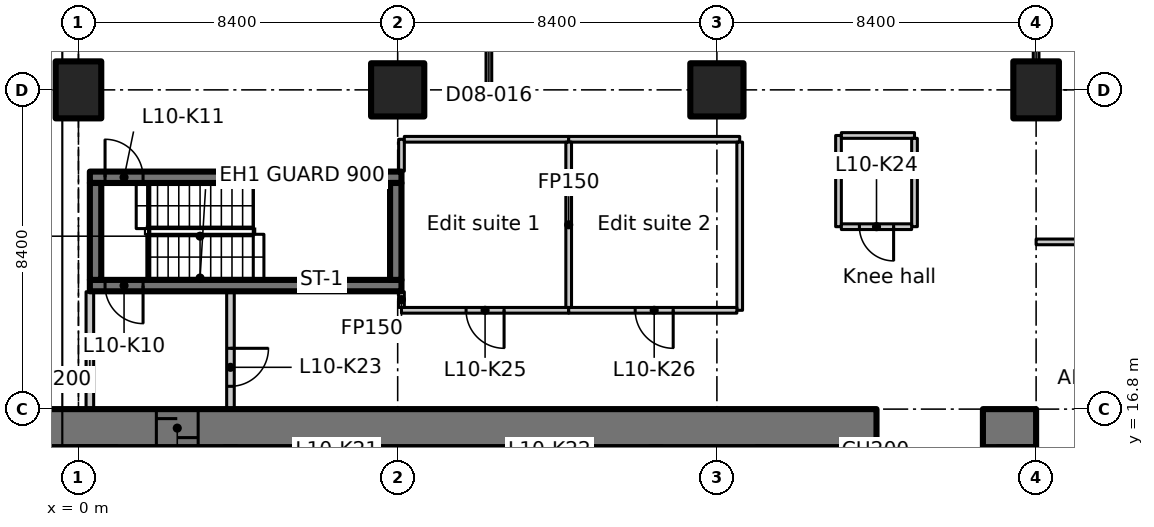
"""IFC4 building model, lengths in metres.
Left out: names, types, materials, properties, quantities, classifications, styles, units other than length and angle.
Written with IfcOpenShell. Run it as: python <this file> out.ifc"""

import sys

from ifc_helpers import new_model, si_unit, direction, frame, frame_2d, origin, origin_2d, place, context, subcontext, project, spatial, polyline, rectangle, outline, extrude, element, fill, save


model = new_model("IFC4")
c1 = context("Model", 3, precision=1e-05, world=origin(), true_north=direction((0.0, 1.0)))
c2 = subcontext(c1, "Body", "Model", "MODEL_VIEW")
j1 = project(units=[si_unit("LENGTHUNIT", "METRE"), si_unit("PLANEANGLEUNIT", "RADIAN")], contexts=[c1])
p1 = place(None, origin())
s1 = spatial("IfcSite", under=j1, at=p1, CompositionType="ELEMENT")
p2 = place(p1, origin())
s2 = spatial("IfcBuilding", under=s1, at=p2, CompositionType="ELEMENT")
p3 = place(p2, frame((0.0, 0.0, 50.9)))
s3 = spatial("IfcBuildingStorey", under=s2, at=p3, CompositionType="ELEMENT", Elevation=50.9)
p4 = place(p3, frame((0.0, 25.2, 0.0), z_axis=(0.0, 0.0, 1.0), x_axis=(1.0, 0.0, 0.0)))
e1 = element("IfcColumn", 1, at=p4, inside=s3, PredefinedType="COLUMN", context=c2, shape_type="SweptSolid", body=[
    extrude(rectangle(XDim=1.2, YDim=1.5, at=origin_2d()), origin(), (0.0, 0.0, 1.0), 3.35),
])
for number, where, z_axis, x_axis in (
    (2, (8.4, 25.2, 0.0), (0.0, 0.0, 1.0), (1.0, 0.0, 0.0)),
    (3, (16.8, 25.2, 0.0), (0.0, 0.0, 1.0), (1.0, 0.0, 0.0)),
):
    element("IfcColumn", number, at=place(p3, frame(where, z_axis=z_axis, x_axis=x_axis)), inside=s3, PredefinedType="COLUMN", context=c2, shape_type="SweptSolid", body=[
        extrude(rectangle(XDim=1.4, YDim=1.4, at=origin_2d()), origin(), (0.0, 0.0, 1.0), 3.35),
    ])
p5 = place(p3, frame((25.2, 25.2, 0.0), z_axis=(0.0, 0.0, 1.0), x_axis=(1.0, 0.0, 0.0)))
e4 = element("IfcColumn", 4, at=p5, inside=s3, PredefinedType="COLUMN", context=c2, shape_type="SweptSolid", body=[
    extrude(rectangle(XDim=1.2, YDim=1.5, at=origin_2d()), origin(), (0.0, 0.0, 1.0), 3.35),
])
p6 = place(p3, frame((-1.1, 16.3, 0.0), z_axis=(0.0, 0.0, 1.0), x_axis=(1.0, 0.0, 0.0)))
e5 = element("IfcWall", 5, at=p6, inside=s3, PredefinedType="SHEAR", context=c2, shape_type="SweptSolid", body=[
    extrude(rectangle(XDim=22.1, YDim=1.0, at=frame_2d((11.05, 0.0))), origin(), (0.0, 0.0, 1.0), 3.35),
])
p7 = place(p6, frame((3.15, 0.0, 0.0)))
e6 = element("IfcOpeningElement", 6, at=p7, cuts=e5, PredefinedType="OPENING", context=c2, shape_type="SweptSolid", body=[
    extrude(rectangle(XDim=1.1, YDim=2.3, at=frame_2d((0.55, 1.15))), frame((0.0, 0.51, 0.0), z_axis=(0.0, -1.0, 0.0), x_axis=(1.0, 0.0, 0.0)), (0.0, 0.0, 1.0), 1.02),
])
p8 = place(p3, frame((23.8, 16.3, 0.0), z_axis=(0.0, 0.0, 1.0), x_axis=(1.0, 0.0, 0.0)))
e7 = element("IfcWall", 7, at=p8, inside=s3, PredefinedType="SHEAR", context=c2, shape_type="SweptSolid", body=[
    extrude(rectangle(XDim=1.4, YDim=1.0, at=frame_2d((0.7, 0.0))), origin(), (0.0, 0.0, 1.0), 3.35),
])
p9 = place(p3, frame((24.7, 12.6, 0.0), z_axis=(0.0, 0.0, 1.0), x_axis=(0.0, 1.0, 0.0)))
e8 = element("IfcWall", 8, at=p9, inside=s3, PredefinedType="SHEAR", context=c2, shape_type="SweptSolid", body=[
    extrude(rectangle(XDim=3.2, YDim=1.0, at=frame_2d((1.6, 0.0))), origin(), (0.0, 0.0, 1.0), 3.35),
])
p10 = place(p3, frame((8.5, 20.05, 0.0), z_axis=(0.0, 0.0, 1.0), x_axis=(-1.0, 0.0, 0.0)))
e9 = element("IfcWall", 9, at=p10, inside=s3, PredefinedType="SHEAR", context=c2, shape_type="SweptSolid", body=[
    extrude(rectangle(XDim=8.2, YDim=0.3, at=frame_2d((4.1, 0.0))), origin(), (0.0, 0.0, 1.0), 3.35),
])
p11 = place(p10, frame((6.8, 0.0, 0.0)))
e10 = element("IfcOpeningElement", 10, at=p11, cuts=e9, PredefinedType="OPENING", context=c2, shape_type="SweptSolid", body=[
    extrude(rectangle(XDim=1.0, YDim=2.1, at=frame_2d((0.5, 1.05))), frame((0.0, 0.16, 0.0), z_axis=(0.0, -1.0, 0.0), x_axis=(1.0, 0.0, 0.0)), (0.0, 0.0, 1.0), 0.32),
])
p12 = place(p3, frame((0.3, 22.9, 0.0), z_axis=(0.0, 0.0, 1.0), x_axis=(1.0, 0.0, 0.0)))
e11 = element("IfcWall", 11, at=p12, inside=s3, PredefinedType="SHEAR", context=c2, shape_type="SweptSolid", body=[
    extrude(rectangle(XDim=8.2, YDim=0.3, at=frame_2d((4.1, 0.0))), origin(), (0.0, 0.0, 1.0), 3.35),
])
p13 = place(p12, frame((0.4, 0.0, 0.0)))
e12 = element("IfcOpeningElement", 12, at=p13, cuts=e11, PredefinedType="OPENING", context=c2, shape_type="SweptSolid", body=[
    extrude(rectangle(XDim=1.0, YDim=2.1, at=frame_2d((0.5, 1.05))), frame((0.0, 0.16, 0.0), z_axis=(0.0, -1.0, 0.0), x_axis=(1.0, 0.0, 0.0)), (0.0, 0.0, 1.0), 0.32),
])
for number, where, z_axis, x_axis in (
    (13, (0.45, 20.2, 0.0), (0.0, 0.0, 1.0), (0.0, 1.0, 0.0)),
    (14, (8.35, 20.2, 0.0), (0.0, 0.0, 1.0), (0.0, 1.0, 0.0)),
):
    element("IfcWall", number, at=place(p3, frame(where, z_axis=z_axis, x_axis=x_axis)), inside=s3, PredefinedType="SHEAR", context=c2, shape_type="SweptSolid", body=[
        extrude(rectangle(XDim=2.55, YDim=0.3, at=frame_2d((1.275, 0.0))), origin(), (0.0, 0.0, 1.0), 3.35),
    ])
p14 = place(p3, frame((0.3, 16.812, 0.0), z_axis=(0.0, 0.0, 1.0), x_axis=(0.0, 1.0, 0.0)))
e15 = element("IfcWall", 15, at=p14, inside=s3, PredefinedType="PARTITIONING", context=c2, shape_type="SweptSolid", body=[
    extrude(rectangle(XDim=3.076, YDim=0.2, at=frame_2d((1.538, 0.0))), origin(), (0.0, 0.0, 1.0), 2.98),
])
p15 = place(p3, frame((4.0, 19.888, 0.0), z_axis=(0.0, 0.0, 1.0), x_axis=(0.0, -1.0, 0.0)))
e16 = element("IfcWall", 16, at=p15, inside=s3, PredefinedType="PARTITIONING", context=c2, shape_type="SweptSolid", body=[
    extrude(rectangle(XDim=3.076, YDim=0.2, at=frame_2d((1.538, 0.0))), origin(), (0.0, 0.0, 1.0), 3.35),
])
p16 = place(p15, frame((1.488, 0.0, 0.0)))
e17 = element("IfcOpeningElement", 17, at=p16, cuts=e16, PredefinedType="OPENING", context=c2, shape_type="SweptSolid", body=[
    extrude(rectangle(XDim=1.0, YDim=2.1, at=frame_2d((0.5, 1.05))), frame((0.0, 0.11, 0.0), z_axis=(0.0, -1.0, 0.0), x_axis=(1.0, 0.0, 0.0)), (0.0, 0.0, 1.0), 0.22),
])
p17 = place(p3, frame((12.9, 19.4, 0.0), z_axis=(0.0, 0.0, 1.0), x_axis=(-1.0, 0.0, 0.0)))
e18 = element("IfcWall", 18, at=p17, inside=s3, PredefinedType="PARTITIONING", context=c2, shape_type="SweptSolid", body=[
    extrude(rectangle(XDim=4.4, YDim=0.15, at=frame_2d((2.2, 0.0))), origin(), (0.0, 0.0, 1.0), 3.35),
])
p18 = place(p17, frame((1.7, 0.0, 0.0)))
e19 = element("IfcOpeningElement", 19, at=p18, cuts=e18, PredefinedType="OPENING", context=c2, shape_type="SweptSolid", body=[
    extrude(rectangle(XDim=1.0, YDim=2.1, at=frame_2d((0.5, 1.05))), frame((0.0, 0.085, 0.0), z_axis=(0.0, -1.0, 0.0), x_axis=(1.0, 0.0, 0.0)), (0.0, 0.0, 1.0), 0.17),
])
p19 = place(p3, frame((8.5, 19.475, 0.0), z_axis=(0.0, 0.0, 1.0), x_axis=(0.0, 1.0, 0.0)))
e20 = element("IfcWall", 20, at=p19, inside=s3, PredefinedType="PARTITIONING", context=c2, shape_type="SweptSolid", body=[
    extrude(rectangle(XDim=0.413, YDim=0.15, at=frame_2d((0.207, 0.0))), origin(), (0.0, 0.0, 1.0), 3.35),
])
p20 = place(p3, frame((8.5, 23.062, 0.0), z_axis=(0.0, 0.0, 1.0), x_axis=(0.0, 1.0, 0.0)))
e21 = element("IfcWall", 21, at=p20, inside=s3, PredefinedType="PARTITIONING", context=c2, shape_type="SweptSolid", body=[
    extrude(rectangle(XDim=0.838, YDim=0.15, at=frame_2d((0.419, 0.0))), origin(), (0.0, 0.0, 1.0), 3.35),
])
p21 = place(p3, frame((8.575, 23.9, 0.0), z_axis=(0.0, 0.0, 1.0), x_axis=(1.0, 0.0, 0.0)))
e22 = element("IfcWall", 22, at=p21, inside=s3, PredefinedType="PARTITIONING", context=c2, shape_type="SweptSolid", body=[
    extrude(rectangle(XDim=4.325, YDim=0.15, at=frame_2d((2.163, 0.0))), origin(), (0.0, 0.0, 1.0), 3.35),
])
p22 = place(p3, frame((12.9, 23.9, 0.0), z_axis=(0.0, 0.0, 1.0), x_axis=(1.0, 0.0, 0.0)))
e23 = element("IfcWall", 23, at=p22, inside=s3, PredefinedType="PARTITIONING", context=c2, shape_type="SweptSolid", body=[
    extrude(rectangle(XDim=4.5, YDim=0.15, at=frame_2d((2.25, 0.0))), origin(), (0.0, 0.0, 1.0), 3.35),
])
p23 = place(p3, frame((17.4, 23.825, 0.0), z_axis=(0.0, 0.0, 1.0), x_axis=(0.0, -1.0, 0.0)))
e24 = element("IfcWall", 24, at=p23, inside=s3, PredefinedType="PARTITIONING", context=c2, shape_type="SweptSolid", body=[
    extrude(rectangle(XDim=4.425, YDim=0.15, at=frame_2d((2.212, 0.0))), origin(), (0.0, 0.0, 1.0), 3.35),
])
p24 = place(p3, frame((17.325, 19.4, 0.0), z_axis=(0.0, 0.0, 1.0), x_axis=(-1.0, 0.0, 0.0)))
e25 = element("IfcWall", 25, at=p24, inside=s3, PredefinedType="PARTITIONING", context=c2, shape_type="SweptSolid", body=[
    extrude(rectangle(XDim=4.425, YDim=0.15, at=frame_2d((2.212, 0.0))), origin(), (0.0, 0.0, 1.0), 3.35),
])
p25 = place(p24, frame((1.675, 0.0, 0.0)))
e26 = element("IfcOpeningElement", 26, at=p25, cuts=e25, PredefinedType="OPENING", context=c2, shape_type="SweptSolid", body=[
    extrude(rectangle(XDim=1.0, YDim=2.1, at=frame_2d((0.5, 1.05))), frame((0.0, 0.085, 0.0), z_axis=(0.0, -1.0, 0.0), x_axis=(1.0, 0.0, 0.0)), (0.0, 0.0, 1.0), 0.17),
])
p26 = place(p3, frame((12.9, 23.825, 0.0), z_axis=(0.0, 0.0, 1.0), x_axis=(0.0, -1.0, 0.0)))
e27 = element("IfcWall", 27, at=p26, inside=s3, PredefinedType="PARTITIONING", context=c2, shape_type="SweptSolid", body=[
    extrude(rectangle(XDim=4.35, YDim=0.15, at=frame_2d((2.175, 0.0))), origin(), (0.0, 0.0, 1.0), 3.35),
])
p27 = place(p3, frame((20.0, 21.6, 0.0), z_axis=(0.0, 0.0, 1.0), x_axis=(0.0, 1.0, 0.0)))
e28 = element("IfcWall", 28, at=p27, inside=s3, PredefinedType="PARTITIONING", context=c2, shape_type="SweptSolid", body=[
    extrude(rectangle(XDim=2.4, YDim=0.15, at=frame_2d((1.2, 0.0))), origin(), (0.0, 0.0, 1.0), 3.35),
])
p28 = place(p3, frame((20.075, 24.0, 0.0), z_axis=(0.0, 0.0, 1.0), x_axis=(1.0, 0.0, 0.0)))
e29 = element("IfcWall", 29, at=p28, inside=s3, PredefinedType="PARTITIONING", context=c2, shape_type="SweptSolid", body=[
    extrude(rectangle(XDim=1.925, YDim=0.15, at=frame_2d((0.962, 0.0))), origin(), (0.0, 0.0, 1.0), 3.35),
])
p29 = place(p3, frame((22.0, 23.925, 0.0), z_axis=(0.0, 0.0, 1.0), x_axis=(0.0, -1.0, 0.0)))
e30 = element("IfcWall", 30, at=p29, inside=s3, PredefinedType="PARTITIONING", context=c2, shape_type="SweptSolid", body=[
    extrude(rectangle(XDim=2.325, YDim=0.15, at=frame_2d((1.163, 0.0))), origin(), (0.0, 0.0, 1.0), 3.35),
])
p30 = place(p3, frame((21.925, 21.6, 0.0), z_axis=(0.0, 0.0, 1.0), x_axis=(-1.0, 0.0, 0.0)))
e31 = element("IfcWall", 31, at=p30, inside=s3, PredefinedType="PARTITIONING", context=c2, shape_type="SweptSolid", body=[
    extrude(rectangle(XDim=1.85, YDim=0.15, at=frame_2d((0.925, 0.0))), origin(), (0.0, 0.0, 1.0), 3.35),
])
p31 = place(p30, frame((0.475, 0.0, 0.0)))
e32 = element("IfcOpeningElement", 32, at=p31, cuts=e31, PredefinedType="OPENING", context=c2, shape_type="SweptSolid", body=[
    extrude(rectangle(XDim=0.9, YDim=2.1, at=frame_2d((0.45, 1.05))), frame((0.0, 0.085, 0.0), z_axis=(0.0, -1.0, 0.0), x_axis=(1.0, 0.0, 0.0)), (0.0, 0.0, 1.0), 0.17),
])
p32 = place(p3, frame((25.2, 21.2, 0.0), z_axis=(0.0, 0.0, 1.0), x_axis=(1.0, 0.0, 0.0)))
e33 = element("IfcWall", 33, at=p32, inside=s3, PredefinedType="PARTITIONING", context=c2, shape_type="SweptSolid", body=[
    extrude(rectangle(XDim=4.2, YDim=0.15, at=frame_2d((2.1, 0.0))), origin(), (0.0, 0.0, 1.0), 3.33),
])
p33 = place(p3, frame((25.2, 31.0, 0.0), z_axis=(0.0, 0.0, 1.0), x_axis=(0.0, -1.0, 0.0)))
e34 = element("IfcWall", 34, at=p33, inside=s3, PredefinedType="PARTITIONING", context=c2, shape_type="SweptSolid", body=[
    extrude(outline(polyline([(0.0, 0.0), (5.03, 0.0), (5.03, 2.98), (0.0, 2.98), (0.0, 0.0)])), frame((0.0, 0.075, 0.0), z_axis=(0.0, -1.0, 0.0), x_axis=(1.0, 0.0, 0.0)), (0.0, 0.0, 1.0), 0.15),
])
p34 = place(p33, frame((1.83, 0.0, 0.0)))
e35 = element("IfcOpeningElement", 35, at=p34, cuts=e34, PredefinedType="OPENING", context=c2, shape_type="SweptSolid", body=[
    extrude(rectangle(XDim=1.1, YDim=2.1, at=frame_2d((0.55, 1.05))), frame((0.0, 0.085, 0.0), z_axis=(0.0, -1.0, 0.0), x_axis=(1.0, 0.0, 0.0)), (0.0, 0.0, 1.0), 0.17),
])
p35 = place(p3, frame((10.8, 25.2, 0.0), z_axis=(0.0, 0.0, 1.0), x_axis=(0.0, 1.0, 0.0)))
e36 = element("IfcWall", 36, at=p35, inside=s3, PredefinedType="PARTITIONING", context=c2, shape_type="SweptSolid", body=[
    extrude(rectangle(XDim=4.2, YDim=0.15, at=frame_2d((2.1, 0.0))), origin(), (0.0, 0.0, 1.0), 3.33),
])
p36 = place(p35, frame((1.5, 0.0, 0.0)))
e37 = element("IfcOpeningElement", 37, at=p36, cuts=e36, PredefinedType="OPENING", context=c2, shape_type="SweptSolid", body=[
    extrude(rectangle(XDim=1.1, YDim=2.1, at=frame_2d((0.55, 1.05))), frame((0.0, 0.085, 0.0), z_axis=(0.0, -1.0, 0.0), x_axis=(1.0, 0.0, 0.0)), (0.0, 0.0, 1.0), 0.17),
])
p37 = place(p7, origin())
e38 = element("IfcDoor", 38, at=p37, inside=s3, OperationType="SLIDING_TO_LEFT", PredefinedType="DOOR", context=c2, shape_type="SweptSolid", body=[
    extrude(rectangle(XDim=1.1, YDim=2.3, at=frame_2d((0.55, 1.15))), frame((0.0, 0.025, 0.0), z_axis=(0.0, -1.0, 0.0), x_axis=(1.0, 0.0, 0.0)), (0.0, 0.0, 1.0), 0.05),
])
fill(e6, e38)
p38 = place(p11, origin())
e39 = element("IfcDoor", 39, at=p38, inside=s3, OperationType="SINGLE_SWING_RIGHT", PredefinedType="DOOR", context=c2, shape_type="SweptSolid", body=[
    extrude(rectangle(XDim=1.0, YDim=2.1, at=frame_2d((0.5, 1.05))), frame((0.0, 0.025, 0.0), z_axis=(0.0, -1.0, 0.0), x_axis=(1.0, 0.0, 0.0)), (0.0, 0.0, 1.0), 0.05),
])
fill(e10, e39)
p39 = place(p13, origin())
e40 = element("IfcDoor", 40, at=p39, inside=s3, OperationType="SINGLE_SWING_LEFT", PredefinedType="DOOR", context=c2, shape_type="SweptSolid", body=[
    extrude(rectangle(XDim=1.0, YDim=2.1, at=frame_2d((0.5, 1.05))), frame((0.0, 0.025, 0.0), z_axis=(0.0, -1.0, 0.0), x_axis=(1.0, 0.0, 0.0)), (0.0, 0.0, 1.0), 0.05),
])
fill(e12, e40)
p40 = place(p16, origin())
e41 = element("IfcDoor", 41, at=p40, inside=s3, OperationType="SINGLE_SWING_LEFT", PredefinedType="DOOR", context=c2, shape_type="SweptSolid", body=[
    extrude(rectangle(XDim=1.0, YDim=2.1, at=frame_2d((0.5, 1.05))), frame((0.0, 0.025, 0.0), z_axis=(0.0, -1.0, 0.0), x_axis=(1.0, 0.0, 0.0)), (0.0, 0.0, 1.0), 0.05),
])
fill(e17, e41)
p41 = place(p31, origin())
e42 = element("IfcDoor", 42, at=p41, inside=s3, OperationType="SINGLE_SWING_RIGHT", PredefinedType="DOOR", context=c2, shape_type="SweptSolid", body=[
    extrude(rectangle(XDim=0.9, YDim=2.1, at=frame_2d((0.45, 1.05))), frame((0.0, 0.025, 0.0), z_axis=(0.0, -1.0, 0.0), x_axis=(1.0, 0.0, 0.0)), (0.0, 0.0, 1.0), 0.05),
])
fill(e32, e42)
p42 = place(p18, origin())
e43 = element("IfcDoor", 43, at=p42, inside=s3, OperationType="SINGLE_SWING_LEFT", PredefinedType="DOOR", context=c2, shape_type="SweptSolid", body=[
    extrude(rectangle(XDim=1.0, YDim=2.1, at=frame_2d((0.5, 1.05))), frame((0.0, 0.025, 0.0), z_axis=(0.0, -1.0, 0.0), x_axis=(1.0, 0.0, 0.0)), (0.0, 0.0, 1.0), 0.05),
])
fill(e19, e43)
p43 = place(p25, origin())
e44 = element("IfcDoor", 44, at=p43, inside=s3, OperationType="SINGLE_SWING_RIGHT", PredefinedType="DOOR", context=c2, shape_type="SweptSolid", body=[
    extrude(rectangle(XDim=1.0, YDim=2.1, at=frame_2d((0.5, 1.05))), frame((0.0, 0.025, 0.0), z_axis=(0.0, -1.0, 0.0), x_axis=(1.0, 0.0, 0.0)), (0.0, 0.0, 1.0), 0.05),
])
fill(e26, e44)
save(model, sys.argv[1])
